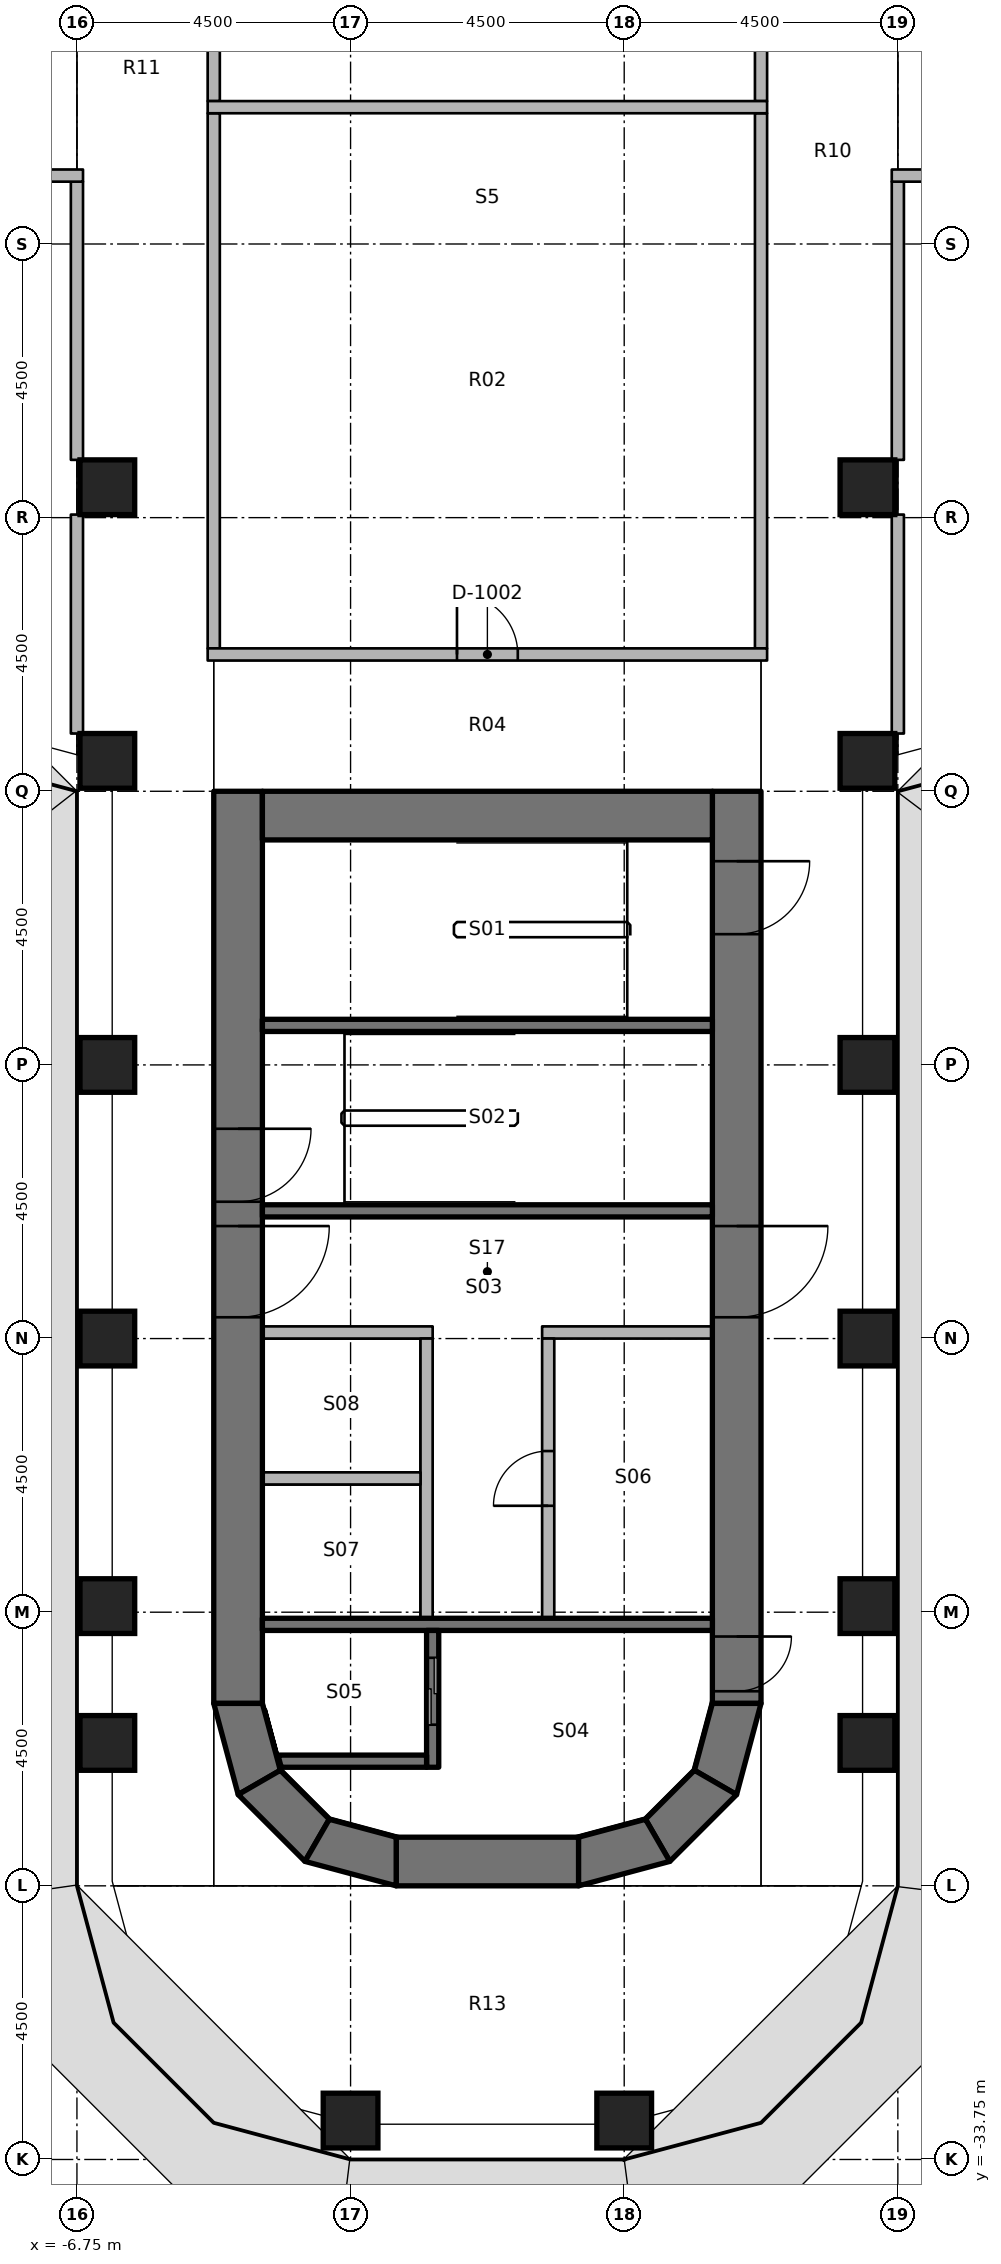
"""IFC4 building model, lengths in metres.
Left out: names, types, materials, properties, quantities, classifications, styles, units other than length and angle.
Written with IfcOpenShell. Run it as: python <this file> out.ifc"""

import sys

from ifc_helpers import new_model, si_unit, direction, frame, frame_2d, origin, origin_2d, place, context, subcontext, project, spatial, polyline, rectangle, outline, extrude, element, fill, save


model = new_model("IFC4")
c1 = context("Model", 3, precision=1e-05, world=origin(), true_north=direction((0.0, 1.0)))
c2 = subcontext(c1, "Body", "Model", "MODEL_VIEW")
j1 = project(units=[si_unit("LENGTHUNIT", "METRE"), si_unit("PLANEANGLEUNIT", "RADIAN")], contexts=[c1])
p1 = place(None, origin())
s1 = spatial("IfcSite", under=j1, at=p1, CompositionType="ELEMENT")
p2 = place(p1, origin())
s2 = spatial("IfcBuilding", under=s1, at=p2, CompositionType="ELEMENT")
p3 = place(p2, frame((0.0, 0.0, 117.0)))
s3 = spatial("IfcBuildingStorey", under=s2, at=p3, CompositionType="ELEMENT", Elevation=117.0)
for number, where, z_axis, x_axis in (
    (1, (-6.25, -26.9, 0.0), (0.0, 0.0, 1.0), (1.0, 0.0, 0.0)),
    (2, (-6.25, -24.65, 0.0), (0.0, 0.0, 1.0), (1.0, 0.0, 0.0)),
    (3, (-6.25, -20.25, 0.0), (0.0, 0.0, 1.0), (1.0, 0.0, 0.0)),
    (4, (-6.25, -15.75, 0.0), (0.0, 0.0, 1.0), (1.0, 0.0, 0.0)),
    (5, (-6.25, -10.75, 0.0), (0.0, 0.0, 1.0), (1.0, 0.0, 0.0)),
    (6, (-6.25, -6.25, 0.0), (0.0, 0.0, 1.0), (1.0, 0.0, 0.0)),
    (7, (-2.25, -33.11, 0.0), (0.0, 0.0, 1.0), (1.0, 0.0, 0.0)),
    (8, (2.25, -33.11, 0.0), (0.0, 0.0, 1.0), (1.0, 0.0, 0.0)),
    (9, (6.25, -26.9, 0.0), (0.0, 0.0, 1.0), (1.0, 0.0, 0.0)),
    (10, (6.25, -24.65, 0.0), (0.0, 0.0, 1.0), (1.0, 0.0, 0.0)),
    (11, (6.25, -20.25, 0.0), (0.0, 0.0, 1.0), (1.0, 0.0, 0.0)),
    (12, (6.25, -15.75, 0.0), (0.0, 0.0, 1.0), (1.0, 0.0, 0.0)),
    (13, (6.25, -10.75, 0.0), (0.0, 0.0, 1.0), (1.0, 0.0, 0.0)),
    (14, (6.25, -6.25, 0.0), (0.0, 0.0, 1.0), (1.0, 0.0, 0.0)),
):
    element("IfcColumn", number, at=place(p3, frame(where, z_axis=z_axis, x_axis=x_axis)), inside=s3, PredefinedType="COLUMN", context=c2, shape_type="SweptSolid", body=[
        extrude(rectangle(XDim=0.9, YDim=0.9, at=origin_2d()), origin(), (0.0, 0.0, 1.0), 3.65),
    ])
p4 = place(p3, frame((-4.1, -11.25, 0.0), z_axis=(0.0, 0.0, 1.0), x_axis=(0.0, -1.0, 0.0)))
e15 = element("IfcWall", 15, at=p4, inside=s3, PredefinedType="SHEAR", context=c2, shape_type="SweptSolid", body=[
    extrude(rectangle(XDim=15.0, YDim=0.8, at=frame_2d((7.5, 0.0))), origin(), (0.0, 0.0, 1.0), 3.8),
])
p5 = place(p4, frame((7.15, 0.0, 0.0)))
e16 = element("IfcOpeningElement", 16, at=p5, cuts=e15, PredefinedType="OPENING", context=c2, shape_type="SweptSolid", body=[
    extrude(rectangle(XDim=1.5, YDim=2.3, at=frame_2d((0.75, 1.15))), frame((0.0, 0.41, 0.0), z_axis=(0.0, -1.0, 0.0), x_axis=(1.0, 0.0, 0.0)), (0.0, 0.0, 1.0), 0.82),
])
p6 = place(p4, frame((5.55, 0.0, 0.0)))
e17 = element("IfcOpeningElement", 17, at=p6, cuts=e15, PredefinedType="OPENING", context=c2, shape_type="SweptSolid", body=[
    extrude(rectangle(XDim=1.2, YDim=2.1, at=frame_2d((0.6, 1.05))), frame((0.0, 0.41, 0.0), z_axis=(0.0, -1.0, 0.0), x_axis=(1.0, 0.0, 0.0)), (0.0, 0.0, 1.0), 0.82),
])
p7 = place(p3, frame((4.1, -11.25, 0.0), z_axis=(0.0, 0.0, 1.0), x_axis=(0.0, -1.0, 0.0)))
e18 = element("IfcWall", 18, at=p7, inside=s3, PredefinedType="SHEAR", context=c2, shape_type="SweptSolid", body=[
    extrude(rectangle(XDim=15.0, YDim=0.8, at=frame_2d((7.5, 0.0))), origin(), (0.0, 0.0, 1.0), 3.8),
])
p8 = place(p7, frame((7.15, 0.0, 0.0)))
e19 = element("IfcOpeningElement", 19, at=p8, cuts=e18, PredefinedType="OPENING", context=c2, shape_type="SweptSolid", body=[
    extrude(rectangle(XDim=1.5, YDim=2.3, at=frame_2d((0.75, 1.15))), frame((0.0, 0.41, 0.0), z_axis=(0.0, -1.0, 0.0), x_axis=(1.0, 0.0, 0.0)), (0.0, 0.0, 1.0), 0.82),
])
p9 = place(p7, frame((13.9, 0.0, 0.0)))
e20 = element("IfcOpeningElement", 20, at=p9, cuts=e18, PredefinedType="OPENING", context=c2, shape_type="SweptSolid", body=[
    extrude(rectangle(XDim=0.9, YDim=2.1, at=frame_2d((0.45, 1.05))), frame((0.0, 0.41, 0.0), z_axis=(0.0, -1.0, 0.0), x_axis=(1.0, 0.0, 0.0)), (0.0, 0.0, 1.0), 0.82),
])
p10 = place(p7, frame((1.15, 0.0, 0.0)))
e21 = element("IfcOpeningElement", 21, at=p10, cuts=e18, PredefinedType="OPENING", context=c2, shape_type="SweptSolid", body=[
    extrude(rectangle(XDim=1.2, YDim=2.1, at=frame_2d((0.6, 1.05))), frame((0.0, 0.41, 0.0), z_axis=(0.0, -1.0, 0.0), x_axis=(1.0, 0.0, 0.0)), (0.0, 0.0, 1.0), 0.82),
])
p11 = place(p3, frame((-3.7, -11.65, 0.0), z_axis=(0.0, 0.0, 1.0), x_axis=(1.0, 0.0, 0.0)))
e22 = element("IfcWall", 22, at=p11, inside=s3, PredefinedType="SHEAR", context=c2, shape_type="SweptSolid", body=[
    extrude(rectangle(XDim=7.4, YDim=0.8, at=frame_2d((3.7, 0.0))), origin(), (0.0, 0.0, 1.0), 3.8),
])
p12 = place(p3, frame((-1.5, -28.85, 0.0), z_axis=(0.0, 0.0, 1.0), x_axis=(1.0, 0.0, 0.0)))
e23 = element("IfcWall", 23, at=p12, inside=s3, PredefinedType="SHEAR", context=c2, shape_type="SweptSolid", body=[
    extrude(rectangle(XDim=3.0, YDim=0.8, at=frame_2d((1.5, 0.0))), origin(), (0.0, 0.0, 1.0), 3.8),
])
p13 = place(p3, origin())
e24 = element("IfcWall", 24, at=p13, inside=s3, PredefinedType="SHEAR", context=c2, shape_type="SweptSolid", body=[
    extrude(outline(polyline([(-4.5, -26.25), (-4.098, -27.75), (-3.405, -27.35), (-3.7, -26.25), (-4.5, -26.25)])), origin(), (0.0, 0.0, 1.0), 3.8),
])
p14 = place(p3, origin())
e25 = element("IfcWall", 25, at=p14, inside=s3, PredefinedType="SHEAR", context=c2, shape_type="SweptSolid", body=[
    extrude(outline(polyline([(-4.098, -27.75), (-3.0, -28.848), (-2.6, -28.155), (-3.405, -27.35), (-4.098, -27.75)])), origin(), (0.0, 0.0, 1.0), 3.8),
])
p15 = place(p3, origin())
e26 = element("IfcWall", 26, at=p15, inside=s3, PredefinedType="SHEAR", context=c2, shape_type="SweptSolid", body=[
    extrude(outline(polyline([(-3.0, -28.848), (-1.5, -29.25), (-1.5, -28.45), (-2.6, -28.155), (-3.0, -28.848)])), origin(), (0.0, 0.0, 1.0), 3.8),
])
p16 = place(p3, origin())
e27 = element("IfcWall", 27, at=p16, inside=s3, PredefinedType="SHEAR", context=c2, shape_type="SweptSolid", body=[
    extrude(outline(polyline([(4.5, -26.25), (4.098, -27.75), (3.405, -27.35), (3.7, -26.25), (4.5, -26.25)])), origin(), (0.0, 0.0, 1.0), 3.8),
])
p17 = place(p3, origin())
e28 = element("IfcWall", 28, at=p17, inside=s3, PredefinedType="SHEAR", context=c2, shape_type="SweptSolid", body=[
    extrude(outline(polyline([(4.098, -27.75), (3.0, -28.848), (2.6, -28.155), (3.405, -27.35), (4.098, -27.75)])), origin(), (0.0, 0.0, 1.0), 3.8),
])
p18 = place(p3, origin())
e29 = element("IfcWall", 29, at=p18, inside=s3, PredefinedType="SHEAR", context=c2, shape_type="SweptSolid", body=[
    extrude(outline(polyline([(3.0, -28.848), (1.5, -29.25), (1.5, -28.45), (2.6, -28.155), (3.0, -28.848)])), origin(), (0.0, 0.0, 1.0), 3.8),
])
p19 = place(p3, frame((3.7, -24.95, 0.0), z_axis=(0.0, 0.0, 1.0), x_axis=(-1.0, 0.0, 0.0)))
e30 = element("IfcWall", 30, at=p19, inside=s3, PredefinedType="SHEAR", context=c2, shape_type="SweptSolid", body=[
    extrude(rectangle(XDim=7.4, YDim=0.2, at=frame_2d((3.7, 0.0))), origin(), (0.0, 0.0, 1.0), 3.65),
])
p20 = place(p3, frame((-0.9, -27.3, 0.0), z_axis=(0.0, 0.0, 1.0), x_axis=(0.0, 1.0, 0.0)))
e31 = element("IfcWall", 31, at=p20, inside=s3, PredefinedType="SHEAR", context=c2, shape_type="SweptSolid", body=[
    extrude(rectangle(XDim=2.25, YDim=0.2, at=frame_2d((1.125, 0.0))), origin(), (0.0, 0.0, 1.0), 3.65),
])
p21 = place(p20, frame((0.7, 0.0, 0.0)))
e32 = element("IfcOpeningElement", 32, at=p21, cuts=e31, PredefinedType="OPENING", context=c2, shape_type="SweptSolid", body=[
    extrude(rectangle(XDim=1.1, YDim=2.3, at=frame_2d((0.55, 1.15))), frame((0.0, 0.11, 0.0), z_axis=(0.0, -1.0, 0.0), x_axis=(1.0, 0.0, 0.0)), (0.0, 0.0, 1.0), 0.22),
])
p22 = place(p3, origin())
e33 = element("IfcWall", 33, at=p22, inside=s3, PredefinedType="SHEAR", context=c2, shape_type="SweptSolid", body=[
    extrude(outline(polyline([(-1.0, -27.1), (-3.444, -27.1), (-3.39, -27.3), (-1.0, -27.3), (-1.0, -27.1)])), origin(), (0.0, 0.0, 1.0), 3.65),
])
for number, where, z_axis, x_axis in (
    (34, (3.7, -18.15, 0.0), (0.0, 0.0, 1.0), (-1.0, 0.0, 0.0)),
    (35, (3.7, -15.1, 0.0), (0.0, 0.0, 1.0), (-1.0, 0.0, 0.0)),
):
    element("IfcWall", number, at=place(p3, frame(where, z_axis=z_axis, x_axis=x_axis)), inside=s3, PredefinedType="SHEAR", context=c2, shape_type="SweptSolid", body=[
        extrude(rectangle(XDim=7.4, YDim=0.2, at=frame_2d((3.7, 0.0))), origin(), (0.0, 0.0, 1.0), 3.65),
    ])
p23 = place(p3, frame((3.7, -20.15, 0.0), z_axis=(0.0, 0.0, 1.0), x_axis=(-1.0, 0.0, 0.0)))
e36 = element("IfcWall", 36, at=p23, inside=s3, PredefinedType="PARTITIONING", context=c2, shape_type="SweptSolid", body=[
    extrude(rectangle(XDim=2.8, YDim=0.2, at=frame_2d((1.4, 0.0))), origin(), (0.0, 0.0, 1.0), 3.65),
])
p24 = place(p3, frame((1.0, -24.85, 0.0), z_axis=(0.0, 0.0, 1.0), x_axis=(0.0, 1.0, 0.0)))
e37 = element("IfcWall", 37, at=p24, inside=s3, PredefinedType="PARTITIONING", context=c2, shape_type="SweptSolid", body=[
    extrude(rectangle(XDim=4.6, YDim=0.2, at=frame_2d((2.3, 0.0))), origin(), (0.0, 0.0, 1.0), 3.65),
])
p25 = place(p24, frame((1.85, 0.0, 0.0)))
e38 = element("IfcOpeningElement", 38, at=p25, cuts=e37, PredefinedType="OPENING", context=c2, shape_type="SweptSolid", body=[
    extrude(rectangle(XDim=0.9, YDim=2.1, at=frame_2d((0.45, 1.05))), frame((0.0, 0.11, 0.0), z_axis=(0.0, -1.0, 0.0), x_axis=(1.0, 0.0, 0.0)), (0.0, 0.0, 1.0), 0.22),
])
p26 = place(p3, frame((-0.9, -20.15, 0.0), z_axis=(0.0, 0.0, 1.0), x_axis=(-1.0, 0.0, 0.0)))
e39 = element("IfcWall", 39, at=p26, inside=s3, PredefinedType="PARTITIONING", context=c2, shape_type="SweptSolid", body=[
    extrude(rectangle(XDim=2.8, YDim=0.2, at=frame_2d((1.4, 0.0))), origin(), (0.0, 0.0, 1.0), 3.65),
])
p27 = place(p3, frame((-1.0, -24.85, 0.0), z_axis=(0.0, 0.0, 1.0), x_axis=(0.0, 1.0, 0.0)))
e40 = element("IfcWall", 40, at=p27, inside=s3, PredefinedType="PARTITIONING", context=c2, shape_type="SweptSolid", body=[
    extrude(rectangle(XDim=4.6, YDim=0.2, at=frame_2d((2.3, 0.0))), origin(), (0.0, 0.0, 1.0), 3.65),
])
p28 = place(p3, frame((-1.1, -22.55, 0.0), z_axis=(0.0, 0.0, 1.0), x_axis=(-1.0, 0.0, 0.0)))
e41 = element("IfcWall", 41, at=p28, inside=s3, PredefinedType="PARTITIONING", context=c2, shape_type="SweptSolid", body=[
    extrude(rectangle(XDim=2.6, YDim=0.2, at=frame_2d((1.3, 0.0))), origin(), (0.0, 0.0, 1.0), 3.65),
])
for number, where, z_axis, x_axis in (
    (42, (-4.5, 0.1, 0.0), (0.0, 0.0, 1.0), (0.0, 1.0, 0.0)),
    (43, (-4.5, -8.9, 0.0), (0.0, 0.0, 1.0), (0.0, 1.0, 0.0)),
):
    element("IfcWall", number, at=place(p3, frame(where, z_axis=z_axis, x_axis=x_axis)), inside=s3, PredefinedType="PARTITIONING", context=c2, shape_type="SweptSolid", body=[
        extrude(rectangle(XDim=8.8, YDim=0.2, at=frame_2d((4.4, 0.0))), origin(), (0.0, 0.0, 1.0), 2.738),
    ])
p29 = place(p3, frame((-6.75, -10.3, 0.0), z_axis=(0.0, 0.0, 1.0), x_axis=(0.0, 1.0, 0.0)))
e44 = element("IfcWall", 44, at=p29, inside=s3, PredefinedType="PARTITIONING", context=c2, shape_type="SweptSolid", body=[
    extrude(rectangle(XDim=3.6, YDim=0.2, at=frame_2d((1.8, 0.0))), origin(), (0.0, 0.0, 1.0), 2.738),
])
p30 = place(p3, frame((-6.75, -5.8, 0.0), z_axis=(0.0, 0.0, 1.0), x_axis=(0.0, 1.0, 0.0)))
e45 = element("IfcWall", 45, at=p30, inside=s3, PredefinedType="PARTITIONING", context=c2, shape_type="SweptSolid", body=[
    extrude(rectangle(XDim=4.575, YDim=0.2, at=frame_2d((2.288, 0.0))), origin(), (0.0, 0.0, 1.0), 2.738),
])
for number, where, z_axis, x_axis in (
    (46, (4.5, 0.1, 0.0), (0.0, 0.0, 1.0), (0.0, 1.0, 0.0)),
    (47, (4.5, -8.9, 0.0), (0.0, 0.0, 1.0), (0.0, 1.0, 0.0)),
):
    element("IfcWall", number, at=place(p3, frame(where, z_axis=z_axis, x_axis=x_axis)), inside=s3, PredefinedType="PARTITIONING", context=c2, shape_type="SweptSolid", body=[
        extrude(rectangle(XDim=8.8, YDim=0.2, at=frame_2d((4.4, 0.0))), origin(), (0.0, 0.0, 1.0), 2.738),
    ])
p31 = place(p3, frame((6.75, -10.3, 0.0), z_axis=(0.0, 0.0, 1.0), x_axis=(0.0, 1.0, 0.0)))
e48 = element("IfcWall", 48, at=p31, inside=s3, PredefinedType="PARTITIONING", context=c2, shape_type="SweptSolid", body=[
    extrude(rectangle(XDim=3.6, YDim=0.2, at=frame_2d((1.8, 0.0))), origin(), (0.0, 0.0, 1.0), 2.738),
])
p32 = place(p3, frame((6.75, -5.8, 0.0), z_axis=(0.0, 0.0, 1.0), x_axis=(0.0, 1.0, 0.0)))
e49 = element("IfcWall", 49, at=p32, inside=s3, PredefinedType="PARTITIONING", context=c2, shape_type="SweptSolid", body=[
    extrude(rectangle(XDim=4.575, YDim=0.2, at=frame_2d((2.288, 0.0))), origin(), (0.0, 0.0, 1.0), 2.738),
])
p33 = place(p3, frame((-4.6, -9.0, 0.0), z_axis=(0.0, 0.0, 1.0), x_axis=(1.0, 0.0, 0.0)))
e50 = element("IfcWall", 50, at=p33, inside=s3, PredefinedType="PARTITIONING", context=c2, shape_type="SweptSolid", body=[
    extrude(rectangle(XDim=9.2, YDim=0.2, at=frame_2d((4.6, 0.0))), origin(), (0.0, 0.0, 1.0), 2.738),
])
p34 = place(p33, frame((4.1, 0.0, 0.0)))
e51 = element("IfcOpeningElement", 51, at=p34, cuts=e50, PredefinedType="OPENING", context=c2, shape_type="SweptSolid", body=[
    extrude(rectangle(XDim=1.0, YDim=2.1, at=frame_2d((0.5, 1.05))), frame((0.0, 0.11, 0.0), z_axis=(0.0, -1.0, 0.0), x_axis=(1.0, 0.0, 0.0)), (0.0, 0.0, 1.0), 0.22),
])
p35 = place(p3, frame((-4.6, 0.0, 0.0), z_axis=(0.0, 0.0, 1.0), x_axis=(1.0, 0.0, 0.0)))
e52 = element("IfcWall", 52, at=p35, inside=s3, PredefinedType="PARTITIONING", context=c2, shape_type="SweptSolid", body=[
    extrude(rectangle(XDim=9.2, YDim=0.2, at=frame_2d((4.6, 0.0))), origin(), (0.0, 0.0, 1.0), 2.738),
])
p36 = place(p3, frame((11.35, -1.125, 0.0), z_axis=(0.0, 0.0, 1.0), x_axis=(-1.0, 0.0, 0.0)))
e53 = element("IfcWall", 53, at=p36, inside=s3, PredefinedType="PARTITIONING", context=c2, shape_type="SweptSolid", body=[
    extrude(rectangle(XDim=4.7, YDim=0.2, at=frame_2d((2.35, 0.0))), origin(), (0.0, 0.0, 1.0), 2.738),
])
p37 = place(p36, frame((1.85, 0.0, 0.0)))
e54 = element("IfcOpeningElement", 54, at=p37, cuts=e53, PredefinedType="OPENING", context=c2, shape_type="SweptSolid", body=[
    extrude(rectangle(XDim=1.0, YDim=2.1, at=frame_2d((0.5, 1.05))), frame((0.0, 0.11, 0.0), z_axis=(0.0, -1.0, 0.0), x_axis=(1.0, 0.0, 0.0)), (0.0, 0.0, 1.0), 0.22),
])
p38 = place(p3, frame((-6.65, -1.125, 0.0), z_axis=(0.0, 0.0, 1.0), x_axis=(-1.0, 0.0, 0.0)))
e55 = element("IfcWall", 55, at=p38, inside=s3, PredefinedType="PARTITIONING", context=c2, shape_type="SweptSolid", body=[
    extrude(rectangle(XDim=4.7, YDim=0.2, at=frame_2d((2.35, 0.0))), origin(), (0.0, 0.0, 1.0), 2.738),
])
p39 = place(p38, frame((1.85, 0.0, 0.0)))
e56 = element("IfcOpeningElement", 56, at=p39, cuts=e55, PredefinedType="OPENING", context=c2, shape_type="SweptSolid", body=[
    extrude(rectangle(XDim=1.0, YDim=2.1, at=frame_2d((0.5, 1.05))), frame((0.0, 0.11, 0.0), z_axis=(0.0, -1.0, 0.0), x_axis=(1.0, 0.0, 0.0)), (0.0, 0.0, 1.0), 0.22),
])
p40 = place(p8, origin())
e57 = element("IfcDoor", 57, at=p40, inside=s3, OperationType="DOUBLE_DOOR_SINGLE_SWING", PredefinedType="DOOR", context=c2, shape_type="SweptSolid", body=[
    extrude(rectangle(XDim=1.5, YDim=2.3, at=frame_2d((0.75, 1.15))), frame((0.0, 0.025, 0.0), z_axis=(0.0, -1.0, 0.0), x_axis=(1.0, 0.0, 0.0)), (0.0, 0.0, 1.0), 0.05),
])
fill(e19, e57)
p41 = place(p5, origin())
e58 = element("IfcDoor", 58, at=p41, inside=s3, OperationType="DOUBLE_DOOR_SINGLE_SWING", PredefinedType="DOOR", context=c2, shape_type="SweptSolid", body=[
    extrude(rectangle(XDim=1.5, YDim=2.3, at=frame_2d((0.75, 1.15))), frame((0.0, 0.025, 0.0), z_axis=(0.0, -1.0, 0.0), x_axis=(1.0, 0.0, 0.0)), (0.0, 0.0, 1.0), 0.05),
])
fill(e16, e58)
p42 = place(p9, origin())
e59 = element("IfcDoor", 59, at=p42, inside=s3, OperationType="SINGLE_SWING_RIGHT", PredefinedType="DOOR", context=c2, shape_type="SweptSolid", body=[
    extrude(rectangle(XDim=0.9, YDim=2.1, at=frame_2d((0.45, 1.05))), frame((0.0, 0.025, 0.0), z_axis=(0.0, -1.0, 0.0), x_axis=(1.0, 0.0, 0.0)), (0.0, 0.0, 1.0), 0.05),
])
fill(e20, e59)
p43 = place(p6, origin())
e60 = element("IfcDoor", 60, at=p43, inside=s3, OperationType="SINGLE_SWING_RIGHT", PredefinedType="DOOR", context=c2, shape_type="SweptSolid", body=[
    extrude(rectangle(XDim=1.2, YDim=2.1, at=frame_2d((0.6, 1.05))), frame((0.0, 0.025, 0.0), z_axis=(0.0, -1.0, 0.0), x_axis=(1.0, 0.0, 0.0)), (0.0, 0.0, 1.0), 0.05),
])
fill(e17, e60)
p44 = place(p10, origin())
e61 = element("IfcDoor", 61, at=p44, inside=s3, OperationType="SINGLE_SWING_LEFT", PredefinedType="DOOR", context=c2, shape_type="SweptSolid", body=[
    extrude(rectangle(XDim=1.2, YDim=2.1, at=frame_2d((0.6, 1.05))), frame((0.0, 0.025, 0.0), z_axis=(0.0, -1.0, 0.0), x_axis=(1.0, 0.0, 0.0)), (0.0, 0.0, 1.0), 0.05),
])
fill(e21, e61)
p45 = place(p21, origin())
e62 = element("IfcDoor", 62, at=p45, inside=s3, OperationType="DOUBLE_DOOR_SLIDING", PredefinedType="DOOR", context=c2, shape_type="SweptSolid", body=[
    extrude(rectangle(XDim=1.1, YDim=2.3, at=frame_2d((0.55, 1.15))), frame((0.0, 0.025, 0.0), z_axis=(0.0, -1.0, 0.0), x_axis=(1.0, 0.0, 0.0)), (0.0, 0.0, 1.0), 0.05),
])
fill(e32, e62)
p46 = place(p25, origin())
e63 = element("IfcDoor", 63, at=p46, inside=s3, OperationType="SINGLE_SWING_RIGHT", PredefinedType="DOOR", context=c2, shape_type="SweptSolid", body=[
    extrude(rectangle(XDim=0.9, YDim=2.1, at=frame_2d((0.45, 1.05))), frame((0.0, 0.025, 0.0), z_axis=(0.0, -1.0, 0.0), x_axis=(1.0, 0.0, 0.0)), (0.0, 0.0, 1.0), 0.05),
])
fill(e38, e63)
p47 = place(p34, origin())
e64 = element("IfcDoor", 64, at=p47, inside=s3, OperationType="SINGLE_SWING_RIGHT", PredefinedType="DOOR", context=c2, shape_type="SweptSolid", body=[
    extrude(rectangle(XDim=1.0, YDim=2.1, at=frame_2d((0.5, 1.05))), frame((0.0, 0.025, 0.0), z_axis=(0.0, -1.0, 0.0), x_axis=(1.0, 0.0, 0.0)), (0.0, 0.0, 1.0), 0.05),
])
fill(e51, e64)
save(model, sys.argv[1])
